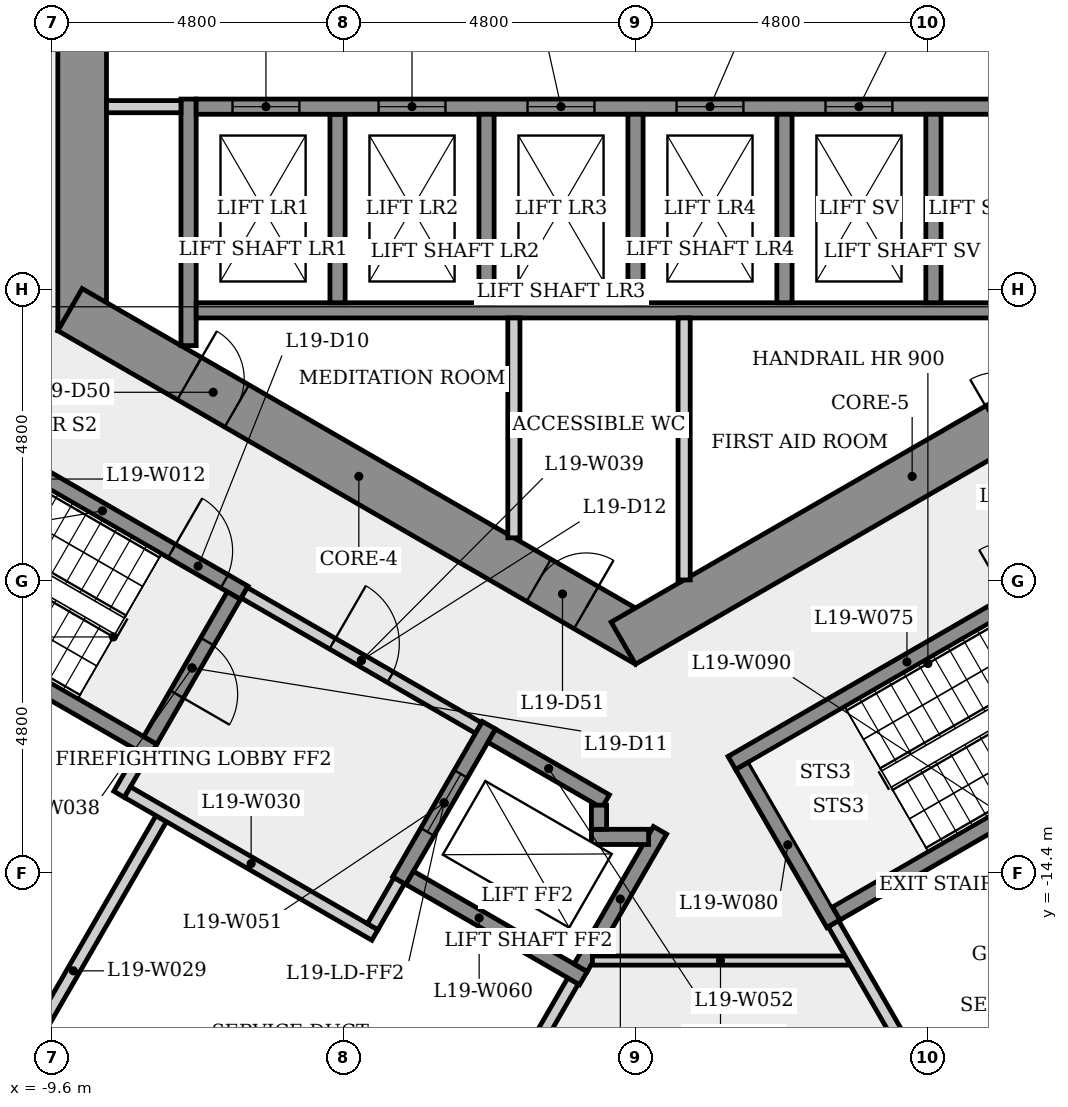
"""IFC4 building model, lengths in metres.
Left out: names, types, materials, properties, quantities, classifications, styles, units other than length and angle.
Written with IfcOpenShell. Run it as: python <this file> out.ifc"""

import sys

from ifc_helpers import new_model, si_unit, direction, frame, frame_2d, origin, place, context, subcontext, project, spatial, rectangle, extrude, element, fill, save


model = new_model("IFC4")
c1 = context("Model", 3, precision=1e-05, world=origin(), true_north=direction((0.0, 1.0)))
c2 = subcontext(c1, "Body", "Model", "MODEL_VIEW")
j1 = project(units=[si_unit("LENGTHUNIT", "METRE"), si_unit("PLANEANGLEUNIT", "RADIAN")], contexts=[c1])
p1 = place(None, origin())
s1 = spatial("IfcSite", under=j1, at=p1, CompositionType="ELEMENT")
p2 = place(p1, origin())
s2 = spatial("IfcBuilding", under=s1, at=p2, CompositionType="ELEMENT")
p3 = place(p2, frame((0.0, 0.0, 74.3)))
s3 = spatial("IfcBuildingStorey", under=s2, at=p3, CompositionType="ELEMENT", Elevation=74.3)
p4 = place(p3, frame((-9.1, 5.485, 0.0), z_axis=(0.0, 0.0, 1.0), x_axis=(0.0, -1.0, 0.0)))
e1 = element("IfcWall", 1, at=p4, inside=s3, PredefinedType="SHEAR", context=c2, shape_type="SweptSolid", body=[
    extrude(rectangle(XDim=10.97, YDim=0.8, at=frame_2d((5.485, 0.0))), origin(), (0.0, 0.0, 1.0), 4.0),
])
p5 = place(p4, frame((4.685, 0.0, 0.0)))
e2 = element("IfcOpeningElement", 2, at=p5, cuts=e1, PredefinedType="OPENING", context=c2, shape_type="SweptSolid", body=[
    extrude(rectangle(XDim=1.6, YDim=2.1, at=frame_2d((0.8, 1.05))), frame((0.0, 0.41, 0.0), z_axis=(0.0, -1.0, 0.0), x_axis=(1.0, 0.0, 0.0)), (0.0, 0.0, 1.0), 0.82),
])
p6 = place(p3, frame((-9.3, -5.138, 0.0), z_axis=(0.0, 0.0, 1.0), x_axis=(0.866023993627, -0.500002442456, 0.0)))
e3 = element("IfcWall", 3, at=p6, inside=s3, PredefinedType="SHEAR", context=c2, shape_type="SweptSolid", body=[
    extrude(rectangle(XDim=10.97, YDim=0.8, at=frame_2d((5.485, 0.0))), origin(), (0.0, 0.0, 1.0), 4.0),
])
p7 = place(p6, frame((2.268, 0.0, 0.0)))
e4 = element("IfcOpeningElement", 4, at=p7, cuts=e3, PredefinedType="OPENING", context=c2, shape_type="SweptSolid", body=[
    extrude(rectangle(XDim=0.9, YDim=2.1, at=frame_2d((0.45, 1.05))), frame((0.0, 0.41, 0.0), z_axis=(0.0, -1.0, 0.0), x_axis=(1.0, 0.0, 0.0)), (0.0, 0.0, 1.0), 0.82),
])
p8 = place(p6, frame((8.903, 0.0, 0.0)))
e5 = element("IfcOpeningElement", 5, at=p8, cuts=e3, PredefinedType="OPENING", context=c2, shape_type="SweptSolid", body=[
    extrude(rectangle(XDim=0.9, YDim=2.1, at=frame_2d((0.45, 1.05))), frame((0.0, 0.41, 0.0), z_axis=(0.0, -1.0, 0.0), x_axis=(1.0, 0.0, 0.0)), (0.0, 0.0, 1.0), 0.82),
])
p9 = place(p3, frame((-0.2, -10.623, 0.0), z_axis=(0.0, 0.0, 1.0), x_axis=(0.866023993627, 0.500002442456, 0.0)))
e6 = element("IfcWall", 6, at=p9, inside=s3, PredefinedType="SHEAR", context=c2, shape_type="SweptSolid", body=[
    extrude(rectangle(XDim=10.97, YDim=0.8, at=frame_2d((5.485, 0.0))), origin(), (0.0, 0.0, 1.0), 4.0),
])
p10 = place(p9, frame((7.108, 0.0, 0.0)))
e7 = element("IfcOpeningElement", 7, at=p10, cuts=e6, PredefinedType="OPENING", context=c2, shape_type="SweptSolid", body=[
    extrude(rectangle(XDim=0.9, YDim=2.1, at=frame_2d((0.45, 1.05))), frame((0.0, 0.41, 0.0), z_axis=(0.0, -1.0, 0.0), x_axis=(1.0, 0.0, 0.0)), (0.0, 0.0, 1.0), 0.82),
])
p11 = place(p3, frame((-11.1, -7.101, 0.0), z_axis=(0.0, 0.0, 1.0), x_axis=(0.866028615007, -0.499994437958, 0.0)))
e8 = element("IfcWall", 8, at=p11, inside=s3, PredefinedType="SHEAR", context=c2, shape_type="SweptSolid", body=[
    extrude(rectangle(XDim=5.387, YDim=0.25, at=frame_2d((2.694, 0.0))), origin(), (0.0, 0.0, 1.0), 3.6),
])
p12 = place(p11, frame((4.012, 0.0, 0.0)))
e9 = element("IfcOpeningElement", 9, at=p12, cuts=e8, PredefinedType="OPENING", context=c2, shape_type="SweptSolid", body=[
    extrude(rectangle(XDim=1.0, YDim=2.1, at=frame_2d((0.5, 1.05))), frame((0.0, 0.135, 0.0), z_axis=(0.0, -1.0, 0.0), x_axis=(1.0, 0.0, 0.0)), (0.0, 0.0, 1.0), 0.27),
])
p13 = place(p3, frame((-8.493, -13.11, 0.0), z_axis=(0.0, 0.0, 1.0), x_axis=(0.500067724834, 0.865986299303, 0.0)))
e10 = element("IfcWall", 10, at=p13, inside=s3, PredefinedType="PLUMBINGWALL", context=c2, shape_type="SweptSolid", body=[
    extrude(rectangle(XDim=0.775, YDim=0.2, at=frame_2d((0.388, 0.0))), origin(), (0.0, 0.0, 1.0), 3.6),
])
p14 = place(p3, frame((-7.935, -12.393, 0.0), z_axis=(0.0, 0.0, 1.0), x_axis=(-0.866025499775, 0.499999833739, 0.0)))
e11 = element("IfcWall", 11, at=p14, inside=s3, PredefinedType="SHEAR", context=c2, shape_type="SweptSolid", body=[
    extrude(rectangle(XDim=6.4, YDim=0.25, at=frame_2d((3.2, 0.0))), origin(), (0.0, 0.0, 1.0), 3.6),
])
p15 = place(p3, frame((-7.8, -13.51, 0.0), z_axis=(0.0, 0.0, 1.0), x_axis=(-0.499982030767, -0.866035778077, 0.0)))
e12 = element("IfcWall", 12, at=p15, inside=s3, PredefinedType="PLUMBINGWALL", context=c2, shape_type="SweptSolid", body=[
    extrude(rectangle(XDim=5.781, YDim=0.2, at=frame_2d((2.89, 0.0))), origin(), (0.0, 0.0, 1.0), 3.6),
])
p16 = place(p3, frame((-8.356, -13.073, 0.0), z_axis=(0.0, 0.0, 1.0), x_axis=(0.866038532462, -0.499977259774, 0.0)))
e13 = element("IfcWall", 13, at=p16, inside=s3, PredefinedType="PLUMBINGWALL", context=c2, shape_type="SweptSolid", body=[
    extrude(rectangle(XDim=4.7, YDim=0.2, at=frame_2d((2.35, 0.0))), origin(), (0.0, 0.0, 1.0), 3.6),
])
p17 = place(p3, frame((-7.35, -5.73, 0.0), z_axis=(0.0, 0.0, 1.0), x_axis=(0.0, 1.0, 0.0)))
e14 = element("IfcWall", 14, at=p17, inside=s3, PredefinedType="SHEAR", context=c2, shape_type="SweptSolid", body=[
    extrude(rectangle(XDim=4.055, YDim=0.25, at=frame_2d((2.028, 0.0))), origin(), (0.0, 0.0, 1.0), 3.6),
])
p18 = place(p3, frame((-7.475, -1.8, 0.0), z_axis=(0.0, 0.0, 1.0), x_axis=(-1.0, 0.0, 0.0)))
e15 = element("IfcWall", 15, at=p18, inside=s3, PredefinedType="PARTITIONING", context=c2, shape_type="SweptSolid", body=[
    extrude(rectangle(XDim=1.225, YDim=0.2, at=frame_2d((0.613, 0.0))), origin(), (0.0, 0.0, 1.0), 3.6),
])
p19 = place(p3, frame((-6.605, -9.841, 0.0), z_axis=(0.0, 0.0, 1.0), x_axis=(-0.499996545922, -0.866027397988, 0.0)))
e16 = element("IfcWall", 16, at=p19, inside=s3, PredefinedType="SHEAR", context=c2, shape_type="SweptSolid", body=[
    extrude(rectangle(XDim=2.75, YDim=0.25, at=frame_2d((1.375, 0.0))), origin(), (0.0, 0.0, 1.0), 3.6),
])
p20 = place(p19, frame((0.875, 0.0, 0.0)))
e17 = element("IfcOpeningElement", 17, at=p20, cuts=e16, PredefinedType="OPENING", context=c2, shape_type="SweptSolid", body=[
    extrude(rectangle(XDim=1.0, YDim=2.1, at=frame_2d((0.5, 1.05))), frame((0.0, 0.135, 0.0), z_axis=(0.0, -1.0, 0.0), x_axis=(1.0, 0.0, 0.0)), (0.0, 0.0, 1.0), 0.27),
])
p21 = place(p3, frame((-6.435, -9.795, 0.0), z_axis=(0.0, 0.0, 1.0), x_axis=(0.866012907634, -0.500021643343, 0.0)))
e18 = element("IfcWall", 18, at=p21, inside=s3, PredefinedType="PARTITIONING", context=c2, shape_type="SweptSolid", body=[
    extrude(rectangle(XDim=4.45, YDim=0.2, at=frame_2d((2.225, 0.0))), origin(), (0.0, 0.0, 1.0), 3.6),
])
p22 = place(p21, frame((1.675, 0.0, 0.0)))
e19 = element("IfcOpeningElement", 19, at=p22, cuts=e18, PredefinedType="OPENING", context=c2, shape_type="SweptSolid", body=[
    extrude(rectangle(XDim=1.1, YDim=2.1, at=frame_2d((0.55, 1.05))), frame((0.0, 0.11, 0.0), z_axis=(0.0, -1.0, 0.0), x_axis=(1.0, 0.0, 0.0)), (0.0, 0.0, 1.0), 0.22),
])
p23 = place(p3, frame((-7.225, -5.15, 0.0), z_axis=(0.0, 0.0, 1.0), x_axis=(1.0, 0.0, 0.0)))
e20 = element("IfcWall", 20, at=p23, inside=s3, PredefinedType="SHEAR", context=c2, shape_type="SweptSolid", body=[
    extrude(rectangle(XDim=14.7, YDim=0.25, at=frame_2d((7.35, 0.0))), origin(), (0.0, 0.0, 1.0), 3.6),
])
p24 = place(p3, frame((-4.9, -1.925, 0.0), z_axis=(0.0, 0.0, 1.0), x_axis=(0.0, -1.0, 0.0)))
e21 = element("IfcWall", 21, at=p24, inside=s3, PredefinedType="SHEAR", context=c2, shape_type="SweptSolid", body=[
    extrude(rectangle(XDim=3.1, YDim=0.25, at=frame_2d((1.55, 0.0))), origin(), (0.0, 0.0, 1.0), 4.0),
])
p25 = place(p3, frame((-7.225, -1.8, 0.0), z_axis=(0.0, 0.0, 1.0), x_axis=(1.0, 0.0, 0.0)))
e22 = element("IfcWall", 22, at=p25, inside=s3, PredefinedType="SHEAR", context=c2, shape_type="SweptSolid", body=[
    extrude(rectangle(XDim=14.7, YDim=0.25, at=frame_2d((7.35, 0.0))), origin(), (0.0, 0.0, 1.0), 3.6),
])
p26 = place(p25, frame((0.597, 0.0, 0.0)))
e23 = element("IfcOpeningElement", 23, at=p26, cuts=e22, PredefinedType="OPENING", context=c2, shape_type="SweptSolid", body=[
    extrude(rectangle(XDim=1.1, YDim=2.1, at=frame_2d((0.55, 1.05))), frame((0.0, 0.135, 0.0), z_axis=(0.0, -1.0, 0.0), x_axis=(1.0, 0.0, 0.0)), (0.0, 0.0, 1.0), 0.27),
])
p27 = place(p25, frame((3.0, 0.0, 0.0)))
e24 = element("IfcOpeningElement", 24, at=p27, cuts=e22, PredefinedType="OPENING", context=c2, shape_type="SweptSolid", body=[
    extrude(rectangle(XDim=1.1, YDim=2.1, at=frame_2d((0.55, 1.05))), frame((0.0, 0.135, 0.0), z_axis=(0.0, -1.0, 0.0), x_axis=(1.0, 0.0, 0.0)), (0.0, 0.0, 1.0), 0.27),
])
p28 = place(p25, frame((5.45, 0.0, 0.0)))
e25 = element("IfcOpeningElement", 25, at=p28, cuts=e22, PredefinedType="OPENING", context=c2, shape_type="SweptSolid", body=[
    extrude(rectangle(XDim=1.1, YDim=2.1, at=frame_2d((0.55, 1.05))), frame((0.0, 0.135, 0.0), z_axis=(0.0, -1.0, 0.0), x_axis=(1.0, 0.0, 0.0)), (0.0, 0.0, 1.0), 0.27),
])
p29 = place(p25, frame((7.9, 0.0, 0.0)))
e26 = element("IfcOpeningElement", 26, at=p29, cuts=e22, PredefinedType="OPENING", context=c2, shape_type="SweptSolid", body=[
    extrude(rectangle(XDim=1.1, YDim=2.1, at=frame_2d((0.55, 1.05))), frame((0.0, 0.135, 0.0), z_axis=(0.0, -1.0, 0.0), x_axis=(1.0, 0.0, 0.0)), (0.0, 0.0, 1.0), 0.27),
])
p30 = place(p25, frame((10.35, 0.0, 0.0)))
e27 = element("IfcOpeningElement", 27, at=p30, cuts=e22, PredefinedType="OPENING", context=c2, shape_type="SweptSolid", body=[
    extrude(rectangle(XDim=1.1, YDim=2.1, at=frame_2d((0.55, 1.05))), frame((0.0, 0.135, 0.0), z_axis=(0.0, -1.0, 0.0), x_axis=(1.0, 0.0, 0.0)), (0.0, 0.0, 1.0), 0.27),
])
p31 = place(p3, frame((-3.885, -14.529, 0.0), z_axis=(0.0, 0.0, 1.0), x_axis=(-0.499859285417, -0.866106630146, 0.0)))
e28 = element("IfcWall", 28, at=p31, inside=s3, PredefinedType="PLUMBINGWALL", context=c2, shape_type="SweptSolid", body=[
    extrude(rectangle(XDim=0.875, YDim=0.2, at=frame_2d((0.438, 0.0))), origin(), (0.0, 0.0, 1.0), 3.6),
])
p32 = place(p3, frame((-2.41, -11.974, 0.0), z_axis=(0.0, 0.0, 1.0), x_axis=(-0.500001826776, -0.866024349092, 0.0)))
e29 = element("IfcWall", 29, at=p32, inside=s3, PredefinedType="SHEAR", context=c2, shape_type="SweptSolid", body=[
    extrude(rectangle(XDim=2.95, YDim=0.25, at=frame_2d((1.475, 0.0))), origin(), (0.0, 0.0, 1.0), 3.6),
])
p33 = place(p32, frame((0.925, 0.0, 0.0)))
e30 = element("IfcOpeningElement", 30, at=p33, cuts=e29, PredefinedType="OPENING", context=c2, shape_type="SweptSolid", body=[
    extrude(rectangle(XDim=1.1, YDim=2.1, at=frame_2d((0.55, 1.05))), frame((0.0, 0.135, 0.0), z_axis=(0.0, -1.0, 0.0), x_axis=(1.0, 0.0, 0.0)), (0.0, 0.0, 1.0), 0.27),
])
p34 = place(p3, frame((-2.364, -12.145, 0.0), z_axis=(0.0, 0.0, 1.0), x_axis=(0.86603892542, -0.499976579108, 0.0)))
e31 = element("IfcWall", 31, at=p34, inside=s3, PredefinedType="SHEAR", context=c2, shape_type="SweptSolid", body=[
    extrude(rectangle(XDim=2.162, YDim=0.25, at=frame_2d((1.081, 0.0))), origin(), (0.0, 0.0, 1.0), 3.6),
])
p35 = place(p3, frame((-2.45, -1.925, 0.0), z_axis=(0.0, 0.0, 1.0), x_axis=(0.0, -1.0, 0.0)))
e32 = element("IfcWall", 32, at=p35, inside=s3, PredefinedType="SHEAR", context=c2, shape_type="SweptSolid", body=[
    extrude(rectangle(XDim=3.1, YDim=0.25, at=frame_2d((1.55, 0.0))), origin(), (0.0, 0.0, 1.0), 4.0),
])
p36 = place(p3, frame((-2.0, -5.275, 0.0), z_axis=(0.0, 0.0, 1.0), x_axis=(0.0, -1.0, 0.0)))
e33 = element("IfcWall", 33, at=p36, inside=s3, PredefinedType="PARTITIONING", context=c2, shape_type="SweptSolid", body=[
    extrude(rectangle(XDim=3.616, YDim=0.2, at=frame_2d((1.808, 0.0))), origin(), (0.0, 0.0, 1.0), 3.6),
])
p37 = place(p3, frame((-1.027, -16.179, 0.0), z_axis=(0.0, 0.0, 1.0), x_axis=(-0.499984476993, -0.866034365811, 0.0)))
e34 = element("IfcWall", 34, at=p37, inside=s3, PredefinedType="PLUMBINGWALL", context=c2, shape_type="SweptSolid", body=[
    extrude(rectangle(XDim=6.856, YDim=0.2, at=frame_2d((3.428, 0.0))), origin(), (0.0, 0.0, 1.0), 3.6),
])
p38 = place(p3, frame((-0.856, -16.133, 0.0), z_axis=(0.0, 0.0, 1.0), x_axis=(-0.866021716278, 0.500006386895, 0.0)))
e35 = element("IfcWall", 35, at=p38, inside=s3, PredefinedType="SHEAR", context=c2, shape_type="SweptSolid", body=[
    extrude(rectangle(XDim=3.3, YDim=0.25, at=frame_2d((1.65, 0.0))), origin(), (0.0, 0.0, 1.0), 3.6),
])
p39 = place(p3, frame((-0.902, -15.962, 0.0), z_axis=(0.0, 0.0, 1.0), x_axis=(0.499981517636, 0.866036074319, 0.0)))
e36 = element("IfcWall", 36, at=p39, inside=s3, PredefinedType="SHEAR", context=c2, shape_type="SweptSolid", body=[
    extrude(rectangle(XDim=2.61, YDim=0.25, at=frame_2d((1.305, 0.0))), origin(), (0.0, 0.0, 1.0), 3.6),
])
p40 = place(p3, frame((-0.725, -13.81, 0.0), z_axis=(0.0, 0.0, 1.0), x_axis=(1.0, 0.0, 0.0)))
e37 = element("IfcWall", 37, at=p40, inside=s3, PredefinedType="SHEAR", context=c2, shape_type="SweptSolid", body=[
    extrude(rectangle(XDim=0.941, YDim=0.25, at=frame_2d((0.47, 0.0))), origin(), (0.0, 0.0, 1.0), 4.0),
])
p41 = place(p3, frame((-0.6, -13.289, 0.0), z_axis=(0.0, 0.0, 1.0), x_axis=(0.0, -1.0, 0.0)))
e38 = element("IfcWall", 38, at=p41, inside=s3, PredefinedType="SHEAR", context=c2, shape_type="SweptSolid", body=[
    extrude(rectangle(XDim=0.396, YDim=0.25, at=frame_2d((0.198, 0.0))), origin(), (0.0, 0.0, 1.0), 4.0),
])
p42 = place(p3, frame((0.0, -1.925, 0.0), z_axis=(0.0, 0.0, 1.0), x_axis=(0.0, -1.0, 0.0)))
e39 = element("IfcWall", 39, at=p42, inside=s3, PredefinedType="SHEAR", context=c2, shape_type="SweptSolid", body=[
    extrude(rectangle(XDim=3.1, YDim=0.25, at=frame_2d((1.55, 0.0))), origin(), (0.0, 0.0, 1.0), 4.0),
])
p43 = place(p3, frame((0.8, -5.275, 0.0), z_axis=(0.0, 0.0, 1.0), x_axis=(0.0, -1.0, 0.0)))
e40 = element("IfcWall", 40, at=p43, inside=s3, PredefinedType="PARTITIONING", context=c2, shape_type="SweptSolid", body=[
    extrude(rectangle(XDim=4.309, YDim=0.2, at=frame_2d((2.155, 0.0))), origin(), (0.0, 0.0, 1.0), 3.6),
])
p44 = place(p3, frame((1.585, -12.595, 0.0), z_axis=(0.0, 0.0, 1.0), x_axis=(0.866036417653, 0.499980922934, 0.0)))
e41 = element("IfcWall", 41, at=p44, inside=s3, PredefinedType="SHEAR", context=c2, shape_type="SweptSolid", body=[
    extrude(rectangle(XDim=6.65, YDim=0.25, at=frame_2d((3.325, 0.0))), origin(), (0.0, 0.0, 1.0), 3.6),
])
p45 = place(p44, frame((5.275, 0.0, 0.0)))
e42 = element("IfcOpeningElement", 42, at=p45, cuts=e41, PredefinedType="OPENING", context=c2, shape_type="SweptSolid", body=[
    extrude(rectangle(XDim=1.0, YDim=2.1, at=frame_2d((0.5, 1.05))), frame((0.0, 0.135, 0.0), z_axis=(0.0, -1.0, 0.0), x_axis=(1.0, 0.0, 0.0)), (0.0, 0.0, 1.0), 0.27),
])
p46 = place(p3, frame((2.45, -1.925, 0.0), z_axis=(0.0, 0.0, 1.0), x_axis=(0.0, -1.0, 0.0)))
e43 = element("IfcWall", 43, at=p46, inside=s3, PredefinedType="SHEAR", context=c2, shape_type="SweptSolid", body=[
    extrude(rectangle(XDim=3.1, YDim=0.25, at=frame_2d((1.55, 0.0))), origin(), (0.0, 0.0, 1.0), 4.0),
])
p47 = place(p3, frame((3.256, -15.239, 0.0), z_axis=(0.0, 0.0, 1.0), x_axis=(-0.50002537861, 0.866010750942, 0.0)))
e44 = element("IfcWall", 44, at=p47, inside=s3, PredefinedType="SHEAR", context=c2, shape_type="SweptSolid", body=[
    extrude(rectangle(XDim=3.0, YDim=0.25, at=frame_2d((1.5, 0.0))), origin(), (0.0, 0.0, 1.0), 3.6),
])
p48 = place(p3, frame((3.505, -15.844, 0.0), z_axis=(0.0, 0.0, 1.0), x_axis=(-1.0, 0.0, 0.0)))
e45 = element("IfcWall", 45, at=p48, inside=s3, PredefinedType="PARTITIONING", context=c2, shape_type="SweptSolid", body=[
    extrude(rectangle(XDim=4.214, YDim=0.15, at=frame_2d((2.107, 0.0))), origin(), (0.0, 0.0, 1.0), 3.6),
])
p49 = place(p3, frame((3.256, -15.239, 0.0), z_axis=(0.0, 0.0, 1.0), x_axis=(0.500021393879, -0.866013051671, 0.0)))
e46 = element("IfcWall", 46, at=p49, inside=s3, PredefinedType="PLUMBINGWALL", context=c2, shape_type="SweptSolid", body=[
    extrude(rectangle(XDim=5.208, YDim=0.2, at=frame_2d((2.604, 0.0))), origin(), (0.0, 0.0, 1.0), 3.6),
])
p50 = place(p3, frame((4.9, -1.925, 0.0), z_axis=(0.0, 0.0, 1.0), x_axis=(0.0, -1.0, 0.0)))
e47 = element("IfcWall", 47, at=p50, inside=s3, PredefinedType="SHEAR", context=c2, shape_type="SweptSolid", body=[
    extrude(rectangle(XDim=3.1, YDim=0.25, at=frame_2d((1.55, 0.0))), origin(), (0.0, 0.0, 1.0), 4.0),
])
p51 = place(p3, frame((3.301, -15.068, 0.0), z_axis=(0.0, 0.0, 1.0), x_axis=(0.866035036182, 0.499983315828, 0.0)))
e48 = element("IfcWall", 48, at=p51, inside=s3, PredefinedType="SHEAR", context=c2, shape_type="SweptSolid", body=[
    extrude(rectangle(XDim=6.4, YDim=0.25, at=frame_2d((3.2, 0.0))), origin(), (0.0, 0.0, 1.0), 4.0),
])
p52 = place(p3, frame((15.974, -15.302, 0.0), z_axis=(0.0, 0.0, 1.0), x_axis=(-0.866022405705, -0.500005192789, 0.0)))
e49 = element("IfcWall", 49, at=p52, inside=s3, PredefinedType="PARTITIONING", context=c2, shape_type="SweptSolid", body=[
    extrude(rectangle(XDim=28.179, YDim=0.1, at=frame_2d((14.089, 0.0))), origin(), (0.0, 0.0, 1.0), 3.6),
])
p53 = place(p26, origin())
e50 = element("IfcDoor", 50, at=p53, inside=s3, OperationType="SLIDING_TO_LEFT", PredefinedType="DOOR", context=c2, shape_type="SweptSolid", body=[
    extrude(rectangle(XDim=1.1, YDim=2.1, at=frame_2d((0.55, 1.05))), frame((0.0, 0.025, 0.0), z_axis=(0.0, -1.0, 0.0), x_axis=(1.0, 0.0, 0.0)), (0.0, 0.0, 1.0), 0.05),
])
fill(e23, e50)
p54 = place(p27, origin())
e51 = element("IfcDoor", 51, at=p54, inside=s3, OperationType="SLIDING_TO_LEFT", PredefinedType="DOOR", context=c2, shape_type="SweptSolid", body=[
    extrude(rectangle(XDim=1.1, YDim=2.1, at=frame_2d((0.55, 1.05))), frame((0.0, 0.025, 0.0), z_axis=(0.0, -1.0, 0.0), x_axis=(1.0, 0.0, 0.0)), (0.0, 0.0, 1.0), 0.05),
])
fill(e24, e51)
p55 = place(p28, origin())
e52 = element("IfcDoor", 52, at=p55, inside=s3, OperationType="SLIDING_TO_LEFT", PredefinedType="DOOR", context=c2, shape_type="SweptSolid", body=[
    extrude(rectangle(XDim=1.1, YDim=2.1, at=frame_2d((0.55, 1.05))), frame((0.0, 0.025, 0.0), z_axis=(0.0, -1.0, 0.0), x_axis=(1.0, 0.0, 0.0)), (0.0, 0.0, 1.0), 0.05),
])
fill(e25, e52)
p56 = place(p29, origin())
e53 = element("IfcDoor", 53, at=p56, inside=s3, OperationType="SLIDING_TO_LEFT", PredefinedType="DOOR", context=c2, shape_type="SweptSolid", body=[
    extrude(rectangle(XDim=1.1, YDim=2.1, at=frame_2d((0.55, 1.05))), frame((0.0, 0.025, 0.0), z_axis=(0.0, -1.0, 0.0), x_axis=(1.0, 0.0, 0.0)), (0.0, 0.0, 1.0), 0.05),
])
fill(e26, e53)
p57 = place(p30, origin())
e54 = element("IfcDoor", 54, at=p57, inside=s3, OperationType="SLIDING_TO_LEFT", PredefinedType="DOOR", context=c2, shape_type="SweptSolid", body=[
    extrude(rectangle(XDim=1.1, YDim=2.1, at=frame_2d((0.55, 1.05))), frame((0.0, 0.025, 0.0), z_axis=(0.0, -1.0, 0.0), x_axis=(1.0, 0.0, 0.0)), (0.0, 0.0, 1.0), 0.05),
])
fill(e27, e54)
p58 = place(p12, origin())
e55 = element("IfcDoor", 55, at=p58, inside=s3, OperationType="SINGLE_SWING_LEFT", PredefinedType="DOOR", context=c2, shape_type="SweptSolid", body=[
    extrude(rectangle(XDim=1.0, YDim=2.1, at=frame_2d((0.5, 1.05))), frame((0.0, 0.025, 0.0), z_axis=(0.0, -1.0, 0.0), x_axis=(1.0, 0.0, 0.0)), (0.0, 0.0, 1.0), 0.05),
])
fill(e9, e55)
p59 = place(p20, origin())
e56 = element("IfcDoor", 56, at=p59, inside=s3, OperationType="SINGLE_SWING_RIGHT", PredefinedType="DOOR", context=c2, shape_type="SweptSolid", body=[
    extrude(rectangle(XDim=1.0, YDim=2.1, at=frame_2d((0.5, 1.05))), frame((0.0, 0.025, 0.0), z_axis=(0.0, -1.0, 0.0), x_axis=(1.0, 0.0, 0.0)), (0.0, 0.0, 1.0), 0.05),
])
fill(e17, e56)
p60 = place(p22, origin())
e57 = element("IfcDoor", 57, at=p60, inside=s3, OperationType="SINGLE_SWING_LEFT", PredefinedType="DOOR", context=c2, shape_type="SweptSolid", body=[
    extrude(rectangle(XDim=1.1, YDim=2.1, at=frame_2d((0.55, 1.05))), frame((0.0, 0.025, 0.0), z_axis=(0.0, -1.0, 0.0), x_axis=(1.0, 0.0, 0.0)), (0.0, 0.0, 1.0), 0.05),
])
fill(e19, e57)
p61 = place(p33, origin())
e58 = element("IfcDoor", 58, at=p61, inside=s3, OperationType="SLIDING_TO_LEFT", PredefinedType="DOOR", context=c2, shape_type="SweptSolid", body=[
    extrude(rectangle(XDim=1.1, YDim=2.1, at=frame_2d((0.55, 1.05))), frame((0.0, 0.025, 0.0), z_axis=(0.0, -1.0, 0.0), x_axis=(1.0, 0.0, 0.0)), (0.0, 0.0, 1.0), 0.05),
])
fill(e30, e58)
p62 = place(p7, origin())
e59 = element("IfcDoor", 59, at=p62, inside=s3, OperationType="SINGLE_SWING_LEFT", PredefinedType="DOOR", context=c2, shape_type="SweptSolid", body=[
    extrude(rectangle(XDim=0.9, YDim=2.1, at=frame_2d((0.45, 1.05))), frame((0.0, 0.025, 0.0), z_axis=(0.0, -1.0, 0.0), x_axis=(1.0, 0.0, 0.0)), (0.0, 0.0, 1.0), 0.05),
])
fill(e4, e59)
p63 = place(p8, origin())
e60 = element("IfcDoor", 60, at=p63, inside=s3, OperationType="SINGLE_SWING_RIGHT", PredefinedType="DOOR", context=c2, shape_type="SweptSolid", body=[
    extrude(rectangle(XDim=0.9, YDim=2.1, at=frame_2d((0.45, 1.05))), frame((0.0, 0.025, 0.0), z_axis=(0.0, -1.0, 0.0), x_axis=(1.0, 0.0, 0.0)), (0.0, 0.0, 1.0), 0.05),
])
fill(e5, e60)
save(model, sys.argv[1])
